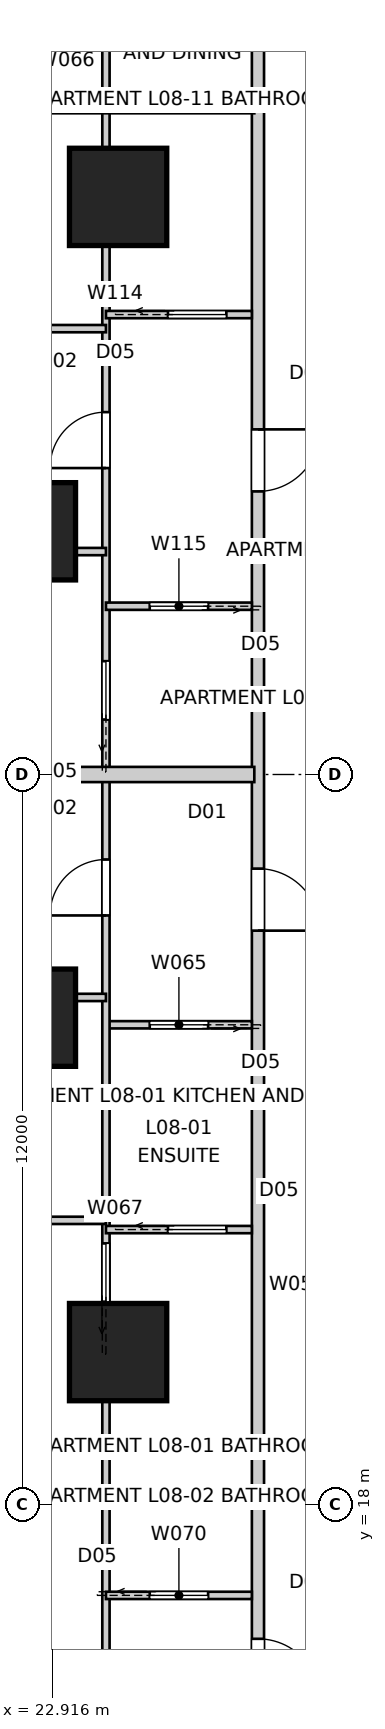
"""IFC4 building model, lengths in metres.
Left out: names, types, materials, properties, quantities, classifications, styles, units other than length and angle.
Written with IfcOpenShell. Run it as: python <this file> out.ifc"""

import sys

from ifc_helpers import new_model, si_unit, direction, frame, frame_2d, origin, origin_2d, place, context, subcontext, project, spatial, rectangle, extrude, element, fill, save


model = new_model("IFC4")
c1 = context("Model", 3, precision=1e-05, world=origin(), true_north=direction((0.0, 1.0)))
c2 = subcontext(c1, "Body", "Model", "MODEL_VIEW")
j1 = project(units=[si_unit("LENGTHUNIT", "METRE"), si_unit("PLANEANGLEUNIT", "RADIAN")], contexts=[c1])
p1 = place(None, origin())
s1 = spatial("IfcSite", under=j1, at=p1, CompositionType="ELEMENT")
p2 = place(p1, origin())
s2 = spatial("IfcBuilding", under=s1, at=p2, CompositionType="ELEMENT")
p3 = place(p2, frame((0.0, 0.0, 32.0)))
s3 = spatial("IfcBuildingStorey", under=s2, at=p3, CompositionType="ELEMENT", Elevation=32.0)
for number, where, z_axis, x_axis in (
    (1, (24.0, 39.5, 0.0), (0.0, 0.0, 1.0), (1.0, 0.0, 0.0)),
    (2, (22.5, 34.0, 0.0), (0.0, 0.0, 1.0), (1.0, 0.0, 0.0)),
    (3, (22.5, 26.0, 0.0), (0.0, 0.0, 1.0), (1.0, 0.0, 0.0)),
    (4, (24.0, 20.5, 0.0), (0.0, 0.0, 1.0), (1.0, 0.0, 0.0)),
):
    element("IfcColumn", number, at=place(p3, frame(where, z_axis=z_axis, x_axis=x_axis)), inside=s3, PredefinedType="COLUMN", context=c2, shape_type="SweptSolid", body=[
        extrude(rectangle(XDim=1.6, YDim=1.6, at=origin_2d()), origin(), (0.0, 0.0, 1.0), 3.4),
    ])
p4 = place(p3, frame((26.3, 46.3, 0.0), z_axis=(0.0, 0.0, 1.0), x_axis=(0.0, -1.0, 0.0)))
e5 = element("IfcWall", 5, at=p4, inside=s3, PredefinedType="PARTITIONING", context=c2, shape_type="SweptSolid", body=[
    extrude(rectangle(XDim=32.6, YDim=0.2, at=frame_2d((16.3, 0.0))), origin(), (0.0, 0.0, 1.0), 3.25),
])
p5 = place(p4, frame((2.315, 0.0, 0.0)))
e6 = element("IfcOpeningElement", 6, at=p5, cuts=e5, PredefinedType="OPENING", context=c2, shape_type="SweptSolid", body=[
    extrude(rectangle(XDim=1.02, YDim=2.34, at=frame_2d((0.51, 1.17))), frame((0.0, 0.11, 0.0), z_axis=(0.0, -1.0, 0.0), x_axis=(1.0, 0.0, 0.0)), (0.0, 0.0, 1.0), 0.22),
])
p6 = place(p4, frame((10.624, 0.0, 0.0)))
e7 = element("IfcOpeningElement", 7, at=p6, cuts=e5, PredefinedType="OPENING", context=c2, shape_type="SweptSolid", body=[
    extrude(rectangle(XDim=1.02, YDim=2.34, at=frame_2d((0.51, 1.17))), frame((0.0, 0.11, 0.0), z_axis=(0.0, -1.0, 0.0), x_axis=(1.0, 0.0, 0.0)), (0.0, 0.0, 1.0), 0.22),
])
p7 = place(p4, frame((17.848, 0.0, 0.0)))
e8 = element("IfcOpeningElement", 8, at=p7, cuts=e5, PredefinedType="OPENING", context=c2, shape_type="SweptSolid", body=[
    extrude(rectangle(XDim=1.02, YDim=2.34, at=frame_2d((0.51, 1.17))), frame((0.0, 0.11, 0.0), z_axis=(0.0, -1.0, 0.0), x_axis=(1.0, 0.0, 0.0)), (0.0, 0.0, 1.0), 0.22),
])
p8 = place(p4, frame((30.516, 0.0, 0.0)))
e9 = element("IfcOpeningElement", 9, at=p8, cuts=e5, PredefinedType="OPENING", context=c2, shape_type="SweptSolid", body=[
    extrude(rectangle(XDim=1.02, YDim=2.34, at=frame_2d((0.51, 1.17))), frame((0.0, 0.11, 0.0), z_axis=(0.0, -1.0, 0.0), x_axis=(1.0, 0.0, 0.0)), (0.0, 0.0, 1.0), 0.22),
])
for number, where, z_axis, x_axis in (
    (10, (14.0, 41.0, 0.0), (0.0, 0.0, 1.0), (1.0, 0.0, 0.0)),
    (11, (14.0, 19.0, 0.0), (0.0, 0.0, 1.0), (1.0, 0.0, 0.0)),
):
    element("IfcWall", number, at=place(p3, frame(where, z_axis=z_axis, x_axis=x_axis)), inside=s3, PredefinedType="PARTITIONING", context=c2, shape_type="SweptSolid", body=[
        extrude(rectangle(XDim=12.24, YDim=0.25, at=frame_2d((6.12, 0.0))), origin(), (0.0, 0.0, 1.0), 3.25),
    ])
p9 = place(p3, frame((22.5, 30.0, 0.0), z_axis=(0.0, 0.0, 1.0), x_axis=(1.0, 0.0, 0.0)))
e12 = element("IfcWall", 12, at=p9, inside=s3, PredefinedType="PARTITIONING", context=c2, shape_type="SweptSolid", body=[
    extrude(rectangle(XDim=3.74, YDim=0.25, at=frame_2d((1.87, 0.0))), origin(), (0.0, 0.0, 1.0), 2.796),
])
p10 = place(p3, frame((26.2, 25.884, 0.0), z_axis=(0.0, 0.0, 1.0), x_axis=(-1.0, 0.0, 0.0)))
e13 = element("IfcWall", 13, at=p10, inside=s3, PredefinedType="PARTITIONING", context=c2, shape_type="SweptSolid", body=[
    extrude(rectangle(XDim=2.4, YDim=0.12, at=frame_2d((1.2, 0.0))), origin(), (0.0, 0.0, 1.0), 3.25),
])
p11 = place(p10, frame((0.72, 0.0, 0.0)))
e14 = element("IfcOpeningElement", 14, at=p11, cuts=e13, PredefinedType="OPENING", context=c2, shape_type="SweptSolid", body=[
    extrude(rectangle(XDim=0.96, YDim=2.1, at=frame_2d((0.48, 1.05))), frame((0.0, 0.07, 0.0), z_axis=(0.0, -1.0, 0.0), x_axis=(1.0, 0.0, 0.0)), (0.0, 0.0, 1.0), 0.14),
])
p12 = place(p3, frame((23.8, 11.2, 0.0), z_axis=(0.0, 0.0, 1.0), x_axis=(0.0, 1.0, 0.0)))
e15 = element("IfcWall", 15, at=p12, inside=s3, PredefinedType="PARTITIONING", context=c2, shape_type="SweptSolid", body=[
    extrude(rectangle(XDim=37.133, YDim=0.12, at=frame_2d((18.567, 0.0))), origin(), (0.0, 0.0, 1.0), 2.55),
])
p13 = place(p12, frame((33.007, 0.0, 0.0)))
e16 = element("IfcOpeningElement", 16, at=p13, cuts=e15, PredefinedType="OPENING", context=c2, shape_type="SweptSolid", body=[
    extrude(rectangle(XDim=0.92, YDim=2.34, at=frame_2d((0.46, 1.17))), frame((0.0, 0.07, 0.0), z_axis=(0.0, -1.0, 0.0), x_axis=(1.0, 0.0, 0.0)), (0.0, 0.0, 1.0), 0.14),
])
p14 = place(p12, frame((23.84, 0.0, 0.0)))
e17 = element("IfcOpeningElement", 17, at=p14, cuts=e15, PredefinedType="OPENING", context=c2, shape_type="SweptSolid", body=[
    extrude(rectangle(XDim=0.92, YDim=2.34, at=frame_2d((0.46, 1.17))), frame((0.0, 0.07, 0.0), z_axis=(0.0, -1.0, 0.0), x_axis=(1.0, 0.0, 0.0)), (0.0, 0.0, 1.0), 0.14),
])
p15 = place(p12, frame((16.482, 0.0, 0.0)))
e18 = element("IfcOpeningElement", 18, at=p15, cuts=e15, PredefinedType="OPENING", context=c2, shape_type="SweptSolid", body=[
    extrude(rectangle(XDim=0.92, YDim=2.34, at=frame_2d((0.46, 1.17))), frame((0.0, 0.07, 0.0), z_axis=(0.0, -1.0, 0.0), x_axis=(1.0, 0.0, 0.0)), (0.0, 0.0, 1.0), 0.14),
])
p16 = place(p12, frame((1.632, 0.0, 0.0)))
e19 = element("IfcOpeningElement", 19, at=p16, cuts=e15, PredefinedType="OPENING", context=c2, shape_type="SweptSolid", body=[
    extrude(rectangle(XDim=0.92, YDim=2.34, at=frame_2d((0.46, 1.17))), frame((0.0, 0.07, 0.0), z_axis=(0.0, -1.0, 0.0), x_axis=(1.0, 0.0, 0.0)), (0.0, 0.0, 1.0), 0.14),
])
p17 = place(p12, frame((19.704, 0.0, 0.0)))
e20 = element("IfcOpeningElement", 20, at=p17, cuts=e15, PredefinedType="OPENING", context=c2, shape_type="SweptSolid", body=[
    extrude(rectangle(XDim=0.96, YDim=2.1, at=frame_2d((0.48, 1.05))), frame((0.0, 0.07, 0.0), z_axis=(0.0, -1.0, 0.0), x_axis=(1.0, 0.0, 0.0)), (0.0, 0.0, 1.0), 0.14),
])
p18 = place(p12, frame((10.128, 0.0, 0.0)))
e21 = element("IfcOpeningElement", 21, at=p18, cuts=e15, PredefinedType="OPENING", context=c2, shape_type="SweptSolid", body=[
    extrude(rectangle(XDim=0.96, YDim=2.1, at=frame_2d((0.48, 1.05))), frame((0.0, 0.07, 0.0), z_axis=(0.0, -1.0, 0.0), x_axis=(1.0, 0.0, 0.0)), (0.0, 0.0, 1.0), 0.14),
])
p19 = place(p3, frame((23.8, 22.515, 0.0), z_axis=(0.0, 0.0, 1.0), x_axis=(1.0, 0.0, 0.0)))
e22 = element("IfcWall", 22, at=p19, inside=s3, PredefinedType="PARTITIONING", context=c2, shape_type="SweptSolid", body=[
    extrude(rectangle(XDim=2.4, YDim=0.12, at=frame_2d((1.2, 0.0))), origin(), (0.0, 0.0, 1.0), 3.25),
])
p20 = place(p19, frame((1.02, 0.0, 0.0)))
e23 = element("IfcOpeningElement", 23, at=p20, cuts=e22, PredefinedType="OPENING", context=c2, shape_type="SweptSolid", body=[
    extrude(rectangle(XDim=0.96, YDim=2.1, at=frame_2d((0.48, 1.05))), frame((0.0, 0.07, 0.0), z_axis=(0.0, -1.0, 0.0), x_axis=(1.0, 0.0, 0.0)), (0.0, 0.0, 1.0), 0.14),
])
p21 = place(p3, frame((23.8, 26.333, 0.0), z_axis=(0.0, 0.0, 1.0), x_axis=(-1.0, 0.0, 0.0)))
e24 = element("IfcWall", 24, at=p21, inside=s3, PredefinedType="PARTITIONING", context=c2, shape_type="SweptSolid", body=[
    extrude(rectangle(XDim=9.76, YDim=0.12, at=frame_2d((4.88, 0.0))), origin(), (0.0, 0.0, 1.0), 3.25),
])
p22 = place(p21, frame((4.44, 0.0, 0.0)))
e25 = element("IfcOpeningElement", 25, at=p22, cuts=e24, PredefinedType="OPENING", context=c2, shape_type="SweptSolid", body=[
    extrude(rectangle(XDim=0.92, YDim=2.34, at=frame_2d((0.46, 1.17))), frame((0.0, 0.07, 0.0), z_axis=(0.0, -1.0, 0.0), x_axis=(1.0, 0.0, 0.0)), (0.0, 0.0, 1.0), 0.14),
])
p23 = place(p3, frame((14.04, 22.667, 0.0), z_axis=(0.0, 0.0, 1.0), x_axis=(1.0, 0.0, 0.0)))
e26 = element("IfcWall", 26, at=p23, inside=s3, PredefinedType="PARTITIONING", context=c2, shape_type="SweptSolid", body=[
    extrude(rectangle(XDim=9.76, YDim=0.12, at=frame_2d((4.88, 0.0))), origin(), (0.0, 0.0, 1.0), 3.25),
])
p24 = place(p3, frame((23.8, 16.499, 0.0), z_axis=(0.0, 0.0, 1.0), x_axis=(1.0, 0.0, 0.0)))
e27 = element("IfcWall", 27, at=p24, inside=s3, PredefinedType="PARTITIONING", context=c2, shape_type="SweptSolid", body=[
    extrude(rectangle(XDim=2.4, YDim=0.12, at=frame_2d((1.2, 0.0))), origin(), (0.0, 0.0, 1.0), 3.25),
])
p25 = place(p24, frame((0.72, 0.0, 0.0)))
e28 = element("IfcOpeningElement", 28, at=p25, cuts=e27, PredefinedType="OPENING", context=c2, shape_type="SweptSolid", body=[
    extrude(rectangle(XDim=0.96, YDim=2.1, at=frame_2d((0.48, 1.05))), frame((0.0, 0.07, 0.0), z_axis=(0.0, -1.0, 0.0), x_axis=(1.0, 0.0, 0.0)), (0.0, 0.0, 1.0), 0.14),
])
p26 = place(p3, frame((23.8, 37.565, 0.0), z_axis=(0.0, 0.0, 1.0), x_axis=(1.0, 0.0, 0.0)))
e29 = element("IfcWall", 29, at=p26, inside=s3, PredefinedType="PARTITIONING", context=c2, shape_type="SweptSolid", body=[
    extrude(rectangle(XDim=2.4, YDim=0.12, at=frame_2d((1.2, 0.0))), origin(), (0.0, 0.0, 1.0), 3.25),
])
p27 = place(p26, frame((1.02, 0.0, 0.0)))
e30 = element("IfcOpeningElement", 30, at=p27, cuts=e29, PredefinedType="OPENING", context=c2, shape_type="SweptSolid", body=[
    extrude(rectangle(XDim=0.96, YDim=2.1, at=frame_2d((0.48, 1.05))), frame((0.0, 0.07, 0.0), z_axis=(0.0, -1.0, 0.0), x_axis=(1.0, 0.0, 0.0)), (0.0, 0.0, 1.0), 0.14),
])
p28 = place(p3, frame((26.2, 32.768, 0.0), z_axis=(0.0, 0.0, 1.0), x_axis=(-1.0, 0.0, 0.0)))
e31 = element("IfcWall", 31, at=p28, inside=s3, PredefinedType="PARTITIONING", context=c2, shape_type="SweptSolid", body=[
    extrude(rectangle(XDim=2.4, YDim=0.12, at=frame_2d((1.2, 0.0))), origin(), (0.0, 0.0, 1.0), 3.25),
])
p29 = place(p28, frame((0.72, 0.0, 0.0)))
e32 = element("IfcOpeningElement", 32, at=p29, cuts=e31, PredefinedType="OPENING", context=c2, shape_type="SweptSolid", body=[
    extrude(rectangle(XDim=0.96, YDim=2.1, at=frame_2d((0.48, 1.05))), frame((0.0, 0.07, 0.0), z_axis=(0.0, -1.0, 0.0), x_axis=(1.0, 0.0, 0.0)), (0.0, 0.0, 1.0), 0.14),
])
p30 = place(p3, frame((23.8, 37.333, 0.0), z_axis=(0.0, 0.0, 1.0), x_axis=(-1.0, 0.0, 0.0)))
e33 = element("IfcWall", 33, at=p30, inside=s3, PredefinedType="PARTITIONING", context=c2, shape_type="SweptSolid", body=[
    extrude(rectangle(XDim=9.76, YDim=0.12, at=frame_2d((4.88, 0.0))), origin(), (0.0, 0.0, 1.0), 3.25),
])
p31 = place(p30, frame((4.44, 0.0, 0.0)))
e34 = element("IfcOpeningElement", 34, at=p31, cuts=e33, PredefinedType="OPENING", context=c2, shape_type="SweptSolid", body=[
    extrude(rectangle(XDim=0.92, YDim=2.34, at=frame_2d((0.46, 1.17))), frame((0.0, 0.07, 0.0), z_axis=(0.0, -1.0, 0.0), x_axis=(1.0, 0.0, 0.0)), (0.0, 0.0, 1.0), 0.14),
])
p32 = place(p3, frame((14.04, 33.667, 0.0), z_axis=(0.0, 0.0, 1.0), x_axis=(1.0, 0.0, 0.0)))
e35 = element("IfcWall", 35, at=p32, inside=s3, PredefinedType="PARTITIONING", context=c2, shape_type="SweptSolid", body=[
    extrude(rectangle(XDim=9.76, YDim=0.12, at=frame_2d((4.88, 0.0))), origin(), (0.0, 0.0, 1.0), 3.25),
])
p33 = place(p6, origin())
e36 = element("IfcDoor", 36, at=p33, inside=s3, OperationType="SINGLE_SWING_LEFT", PredefinedType="DOOR", context=c2, shape_type="SweptSolid", body=[
    extrude(rectangle(XDim=1.02, YDim=2.34, at=frame_2d((0.51, 1.17))), frame((0.0, 0.025, 0.0), z_axis=(0.0, -1.0, 0.0), x_axis=(1.0, 0.0, 0.0)), (0.0, 0.0, 1.0), 0.05),
])
fill(e7, e36)
p34 = place(p7, origin())
e37 = element("IfcDoor", 37, at=p34, inside=s3, OperationType="SINGLE_SWING_RIGHT", PredefinedType="DOOR", context=c2, shape_type="SweptSolid", body=[
    extrude(rectangle(XDim=1.02, YDim=2.34, at=frame_2d((0.51, 1.17))), frame((0.0, 0.025, 0.0), z_axis=(0.0, -1.0, 0.0), x_axis=(1.0, 0.0, 0.0)), (0.0, 0.0, 1.0), 0.05),
])
fill(e8, e37)
p35 = place(p8, origin())
e38 = element("IfcDoor", 38, at=p35, inside=s3, OperationType="SINGLE_SWING_RIGHT", PredefinedType="DOOR", context=c2, shape_type="SweptSolid", body=[
    extrude(rectangle(XDim=1.02, YDim=2.34, at=frame_2d((0.51, 1.17))), frame((0.0, 0.025, 0.0), z_axis=(0.0, -1.0, 0.0), x_axis=(1.0, 0.0, 0.0)), (0.0, 0.0, 1.0), 0.05),
])
fill(e9, e38)
p36 = place(p14, origin())
e39 = element("IfcDoor", 39, at=p36, inside=s3, OperationType="SINGLE_SWING_LEFT", PredefinedType="DOOR", context=c2, shape_type="SweptSolid", body=[
    extrude(rectangle(XDim=0.92, YDim=2.34, at=frame_2d((0.46, 1.17))), frame((0.0, 0.025, 0.0), z_axis=(0.0, -1.0, 0.0), x_axis=(1.0, 0.0, 0.0)), (0.0, 0.0, 1.0), 0.05),
])
fill(e17, e39)
p37 = place(p27, origin())
e40 = element("IfcDoor", 40, at=p37, inside=s3, OperationType="SLIDING_TO_LEFT", PredefinedType="DOOR", context=c2, shape_type="SweptSolid", body=[
    extrude(rectangle(XDim=0.96, YDim=2.1, at=frame_2d((0.48, 1.05))), frame((0.0, 0.025, 0.0), z_axis=(0.0, -1.0, 0.0), x_axis=(1.0, 0.0, 0.0)), (0.0, 0.0, 1.0), 0.05),
])
fill(e30, e40)
p38 = place(p29, origin())
e41 = element("IfcDoor", 41, at=p38, inside=s3, OperationType="SLIDING_TO_LEFT", PredefinedType="DOOR", context=c2, shape_type="SweptSolid", body=[
    extrude(rectangle(XDim=0.96, YDim=2.1, at=frame_2d((0.48, 1.05))), frame((0.0, 0.025, 0.0), z_axis=(0.0, -1.0, 0.0), x_axis=(1.0, 0.0, 0.0)), (0.0, 0.0, 1.0), 0.05),
])
fill(e32, e41)
p39 = place(p15, origin())
e42 = element("IfcDoor", 42, at=p39, inside=s3, OperationType="SINGLE_SWING_LEFT", PredefinedType="DOOR", context=c2, shape_type="SweptSolid", body=[
    extrude(rectangle(XDim=0.92, YDim=2.34, at=frame_2d((0.46, 1.17))), frame((0.0, 0.025, 0.0), z_axis=(0.0, -1.0, 0.0), x_axis=(1.0, 0.0, 0.0)), (0.0, 0.0, 1.0), 0.05),
])
fill(e18, e42)
p40 = place(p11, origin())
e43 = element("IfcDoor", 43, at=p40, inside=s3, OperationType="SLIDING_TO_LEFT", PredefinedType="DOOR", context=c2, shape_type="SweptSolid", body=[
    extrude(rectangle(XDim=0.96, YDim=2.1, at=frame_2d((0.48, 1.05))), frame((0.0, 0.025, 0.0), z_axis=(0.0, -1.0, 0.0), x_axis=(1.0, 0.0, 0.0)), (0.0, 0.0, 1.0), 0.05),
])
fill(e14, e43)
p41 = place(p25, origin())
e44 = element("IfcDoor", 44, at=p41, inside=s3, OperationType="SLIDING_TO_LEFT", PredefinedType="DOOR", context=c2, shape_type="SweptSolid", body=[
    extrude(rectangle(XDim=0.96, YDim=2.1, at=frame_2d((0.48, 1.05))), frame((0.0, 0.025, 0.0), z_axis=(0.0, -1.0, 0.0), x_axis=(1.0, 0.0, 0.0)), (0.0, 0.0, 1.0), 0.05),
])
fill(e28, e44)
p42 = place(p17, origin())
e45 = element("IfcDoor", 45, at=p42, inside=s3, OperationType="SLIDING_TO_LEFT", PredefinedType="DOOR", context=c2, shape_type="SweptSolid", body=[
    extrude(rectangle(XDim=0.96, YDim=2.1, at=frame_2d((0.48, 1.05))), frame((0.0, 0.025, 0.0), z_axis=(0.0, -1.0, 0.0), x_axis=(1.0, 0.0, 0.0)), (0.0, 0.0, 1.0), 0.05),
])
fill(e20, e45)
p43 = place(p20, origin())
e46 = element("IfcDoor", 46, at=p43, inside=s3, OperationType="SLIDING_TO_LEFT", PredefinedType="DOOR", context=c2, shape_type="SweptSolid", body=[
    extrude(rectangle(XDim=0.96, YDim=2.1, at=frame_2d((0.48, 1.05))), frame((0.0, 0.025, 0.0), z_axis=(0.0, -1.0, 0.0), x_axis=(1.0, 0.0, 0.0)), (0.0, 0.0, 1.0), 0.05),
])
fill(e23, e46)
p44 = place(p18, origin())
e47 = element("IfcDoor", 47, at=p44, inside=s3, OperationType="SLIDING_TO_LEFT", PredefinedType="DOOR", context=c2, shape_type="SweptSolid", body=[
    extrude(rectangle(XDim=0.96, YDim=2.1, at=frame_2d((0.48, 1.05))), frame((0.0, 0.025, 0.0), z_axis=(0.0, -1.0, 0.0), x_axis=(1.0, 0.0, 0.0)), (0.0, 0.0, 1.0), 0.05),
])
fill(e21, e47)
save(model, sys.argv[1])
